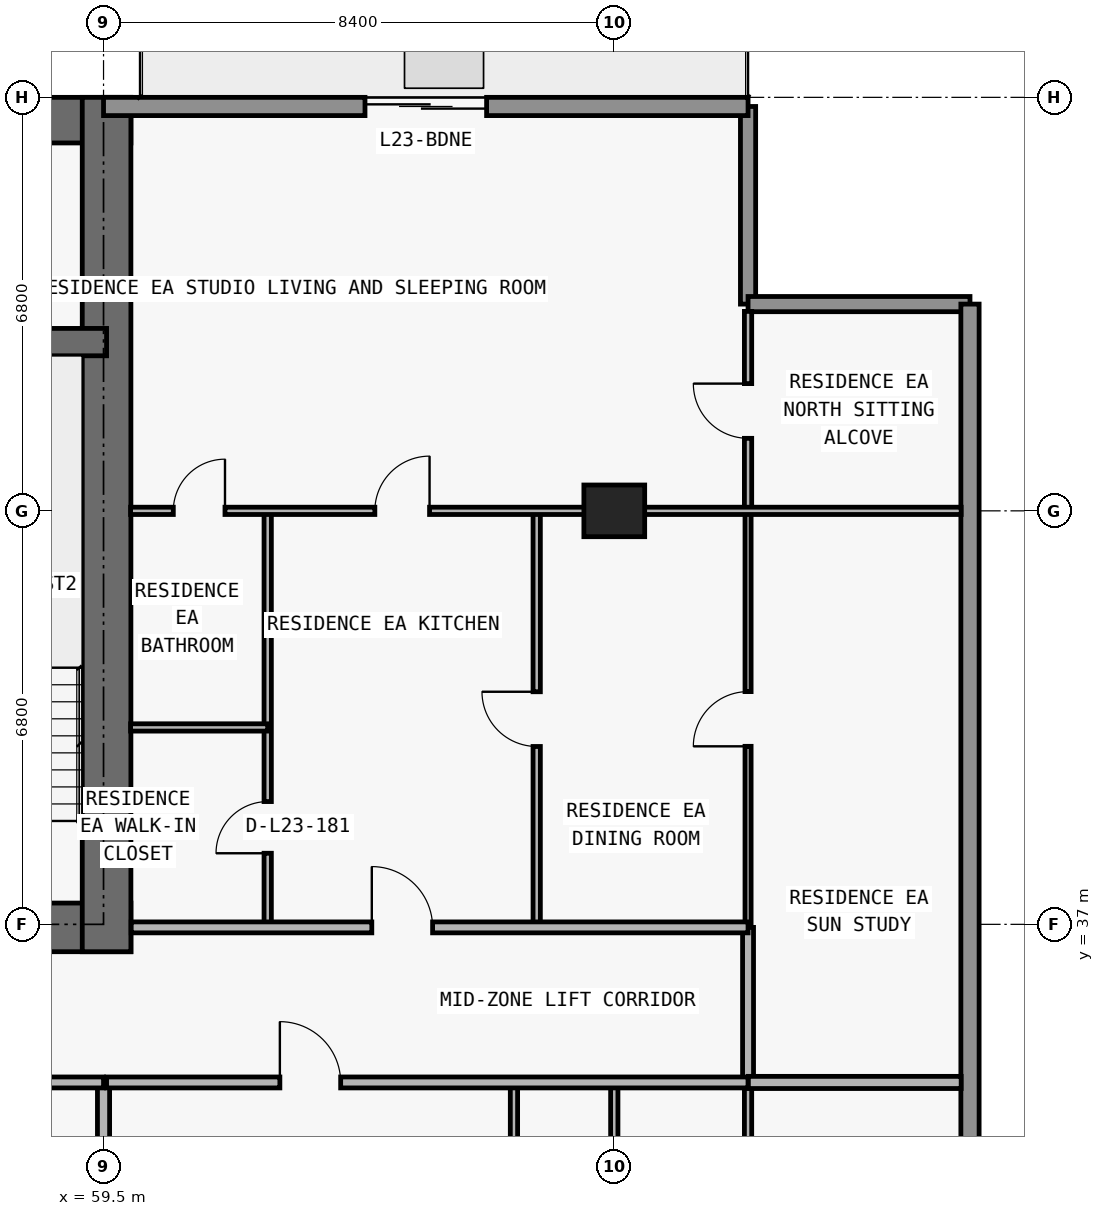
"""IFC4 building model, lengths in metres.
Left out: names, types, materials, properties, quantities, classifications, styles, units other than length and angle.
Written with IfcOpenShell. Run it as: python <this file> out.ifc"""

import sys

from ifc_helpers import new_model, si_unit, direction, frame, frame_2d, origin, origin_2d, place, context, subcontext, project, spatial, rectangle, extrude, element, fill, save


model = new_model("IFC4")
c1 = context("Model", 3, precision=1e-05, world=origin(), true_north=direction((0.0, 1.0)))
c2 = subcontext(c1, "Body", "Model", "MODEL_VIEW")
j1 = project(units=[si_unit("LENGTHUNIT", "METRE"), si_unit("PLANEANGLEUNIT", "RADIAN")], contexts=[c1])
p1 = place(None, origin())
s1 = spatial("IfcSite", under=j1, at=p1, CompositionType="ELEMENT")
p2 = place(p1, origin())
s2 = spatial("IfcBuilding", under=s1, at=p2, CompositionType="ELEMENT")
p3 = place(p2, frame((0.0, 0.0, 87.9)))
s3 = spatial("IfcBuildingStorey", under=s2, at=p3, CompositionType="ELEMENT", Elevation=87.9)
p4 = place(p3, frame((67.9, 43.8, 0.0), z_axis=(0.0, 0.0, 1.0), x_axis=(1.0, 0.0, 0.0)))
e1 = element("IfcColumn", 1, at=p4, inside=s3, PredefinedType="COLUMN", context=c2, shape_type="SweptSolid", body=[
    extrude(rectangle(XDim=1.0, YDim=0.85, at=origin_2d()), origin(), (0.0, 0.0, 1.0), 3.05),
])
p5 = place(p3, frame((17.85, 36.95, 0.0), z_axis=(0.0, 0.0, 1.0), x_axis=(1.0, 0.0, 0.0)))
e2 = element("IfcWall", 2, at=p5, inside=s3, PredefinedType="SHEAR", context=c2, shape_type="SweptSolid", body=[
    extrude(rectangle(XDim=42.1, YDim=0.8, at=frame_2d((21.05, 0.0))), origin(), (0.0, 0.0, 1.0), 3.05),
])
p6 = place(p5, frame((14.45, 0.0, 0.0)))
e3 = element("IfcOpeningElement", 3, at=p6, cuts=e2, PredefinedType="OPENING", context=c2, shape_type="SweptSolid", body=[
    extrude(rectangle(XDim=1.1, YDim=2.15, at=frame_2d((0.55, 1.075))), frame((0.0, 0.41, 0.0), z_axis=(0.0, -1.0, 0.0), x_axis=(1.0, 0.0, 0.0)), (0.0, 0.0, 1.0), 0.82),
])
p7 = place(p5, frame((6.3, 0.0, 0.0)))
e4 = element("IfcOpeningElement", 4, at=p7, cuts=e2, PredefinedType="OPENING", context=c2, shape_type="SweptSolid", body=[
    extrude(rectangle(XDim=1.05, YDim=2.15, at=frame_2d((0.525, 1.075))), frame((0.0, 0.41, 0.0), z_axis=(0.0, -1.0, 0.0), x_axis=(1.0, 0.0, 0.0)), (0.0, 0.0, 1.0), 0.82),
])
p8 = place(p5, frame((34.8, 0.0, 0.0)))
e5 = element("IfcOpeningElement", 5, at=p8, cuts=e2, PredefinedType="OPENING", context=c2, shape_type="SweptSolid", body=[
    extrude(rectangle(XDim=1.05, YDim=2.15, at=frame_2d((0.525, 1.075))), frame((0.0, 0.41, 0.0), z_axis=(0.0, -1.0, 0.0), x_axis=(1.0, 0.0, 0.0)), (0.0, 0.0, 1.0), 0.82),
])
p9 = place(p5, frame((10.913, 0.0, 0.0)))
e6 = element("IfcOpeningElement", 6, at=p9, cuts=e2, PredefinedType="OPENING", context=c2, shape_type="SweptSolid", body=[
    extrude(rectangle(XDim=1.05, YDim=2.15, at=frame_2d((0.525, 1.075))), frame((0.0, 0.41, 0.0), z_axis=(0.0, -1.0, 0.0), x_axis=(1.0, 0.0, 0.0)), (0.0, 0.0, 1.0), 0.82),
])
p10 = place(p5, frame((24.15, 0.0, 0.0)))
e7 = element("IfcOpeningElement", 7, at=p10, cuts=e2, PredefinedType="OPENING", context=c2, shape_type="SweptSolid", body=[
    extrude(rectangle(XDim=1.05, YDim=2.15, at=frame_2d((0.525, 1.075))), frame((0.0, 0.41, 0.0), z_axis=(0.0, -1.0, 0.0), x_axis=(1.0, 0.0, 0.0)), (0.0, 0.0, 1.0), 0.82),
])
p11 = place(p3, frame((17.85, 50.225, 0.0), z_axis=(0.0, 0.0, 1.0), x_axis=(1.0, 0.0, 0.0)))
e8 = element("IfcWall", 8, at=p11, inside=s3, PredefinedType="SHEAR", context=c2, shape_type="SweptSolid", body=[
    extrude(rectangle(XDim=42.1, YDim=0.75, at=frame_2d((21.05, 0.0))), origin(), (0.0, 0.0, 1.0), 3.05),
])
p12 = place(p3, frame((59.55, 36.55, 0.0), z_axis=(0.0, 0.0, 1.0), x_axis=(0.0, 1.0, 0.0)))
e9 = element("IfcWall", 9, at=p12, inside=s3, PredefinedType="SHEAR", context=c2, shape_type="SweptSolid", body=[
    extrude(rectangle(XDim=14.05, YDim=0.8, at=frame_2d((7.025, 0.0))), origin(), (0.0, 0.0, 1.0), 3.05),
])
p13 = place(p3, frame((18.25, 46.575, 0.0), z_axis=(0.0, 0.0, 1.0), x_axis=(1.0, 0.0, 0.0)))
e10 = element("IfcWall", 10, at=p13, inside=s3, PredefinedType="SHEAR", context=c2, shape_type="SweptSolid", body=[
    extrude(rectangle(XDim=41.3, YDim=0.45, at=frame_2d((20.65, 0.0))), origin(), (0.0, 0.0, 1.0), 3.05),
])
p14 = place(p13, frame((7.625, 0.0, 0.0)))
e11 = element("IfcOpeningElement", 11, at=p14, cuts=e10, PredefinedType="OPENING", context=c2, shape_type="SweptSolid", body=[
    extrude(rectangle(XDim=1.05, YDim=2.15, at=frame_2d((0.525, 1.075))), frame((0.0, 0.235, 0.0), z_axis=(0.0, -1.0, 0.0), x_axis=(1.0, 0.0, 0.0)), (0.0, 0.0, 1.0), 0.47),
])
p15 = place(p13, frame((32.675, 0.0, 0.0)))
e12 = element("IfcOpeningElement", 12, at=p15, cuts=e10, PredefinedType="OPENING", context=c2, shape_type="SweptSolid", body=[
    extrude(rectangle(XDim=1.05, YDim=2.15, at=frame_2d((0.525, 1.075))), frame((0.0, 0.235, 0.0), z_axis=(0.0, -1.0, 0.0), x_axis=(1.0, 0.0, 0.0)), (0.0, 0.0, 1.0), 0.47),
])
p16 = place(p3, frame((70.1, 50.45, 0.0), z_axis=(0.0, 0.0, 1.0), x_axis=(0.0, -1.0, 0.0)))
e13 = element("IfcWall", 13, at=p16, inside=s3, PredefinedType="ELEMENTEDWALL", context=c2, shape_type="SweptSolid", body=[
    extrude(rectangle(XDim=3.25, YDim=0.25, at=frame_2d((1.625, 0.0))), origin(), (0.0, 0.0, 1.0), 3.05),
])
p17 = place(p3, frame((70.1, 47.2, 0.0), z_axis=(0.0, 0.0, 1.0), x_axis=(1.0, 0.0, 0.0)))
e14 = element("IfcWall", 14, at=p17, inside=s3, PredefinedType="ELEMENTEDWALL", context=c2, shape_type="SweptSolid", body=[
    extrude(rectangle(XDim=3.65, YDim=0.25, at=frame_2d((1.825, 0.0))), origin(), (0.0, 0.0, 1.0), 3.05),
])
p18 = place(p3, frame((73.75, 47.2, 0.0), z_axis=(0.0, 0.0, 1.0), x_axis=(0.0, -1.0, 0.0)))
e15 = element("IfcWall", 15, at=p18, inside=s3, PredefinedType="STANDARD", context=c2, shape_type="SweptSolid", body=[
    extrude(rectangle(XDim=19.2, YDim=0.3, at=frame_2d((9.6, 0.0))), origin(), (0.0, 0.0, 1.0), 3.05),
])
p19 = place(p3, frame((59.5, 50.45, 0.0), z_axis=(0.0, 0.0, 1.0), x_axis=(1.0, 0.0, 0.0)))
e16 = element("IfcWall", 16, at=p19, inside=s3, PredefinedType="STANDARD", context=c2, shape_type="SweptSolid", body=[
    extrude(rectangle(XDim=10.6, YDim=0.3, at=frame_2d((5.3, 0.0))), origin(), (0.0, 0.0, 1.0), 3.05),
])
p20 = place(p19, frame((4.3, 0.0, 0.0)))
e17 = element("IfcOpeningElement", 17, at=p20, cuts=e16, PredefinedType="OPENING", context=c2, shape_type="SweptSolid", body=[
    extrude(rectangle(XDim=2.0, YDim=2.3, at=frame_2d((1.0, 1.15))), frame((0.0, 0.16, 0.0), z_axis=(0.0, -1.0, 0.0), x_axis=(1.0, 0.0, 0.0)), (0.0, 0.0, 1.0), 0.32),
])
p21 = place(p3, frame((59.5, 27.44, 0.0), z_axis=(0.0, 0.0, 1.0), x_axis=(0.0, 1.0, 0.0)))
e18 = element("IfcWall", 18, at=p21, inside=s3, PredefinedType="PARTITIONING", context=c2, shape_type="SweptSolid", body=[
    extrude(rectangle(XDim=6.96, YDim=0.2, at=frame_2d((3.48, 0.0))), origin(), (0.0, 0.0, 1.0), 2.174),
])
p22 = place(p3, frame((62.2, 36.95, 0.0), z_axis=(0.0, 0.0, 1.0), x_axis=(0.0, 1.0, 0.0)))
e19 = element("IfcWall", 19, at=p22, inside=s3, PredefinedType="PARTITIONING", context=c2, shape_type="SweptSolid", body=[
    extrude(rectangle(XDim=6.85, YDim=0.12, at=frame_2d((3.425, 0.0))), origin(), (0.0, 0.0, 1.0), 3.05),
])
p23 = place(p22, frame((1.219, 0.0, 0.0)))
e20 = element("IfcOpeningElement", 20, at=p23, cuts=e19, PredefinedType="OPENING", context=c2, shape_type="SweptSolid", body=[
    extrude(rectangle(XDim=0.85, YDim=2.1, at=frame_2d((0.425, 1.05))), frame((0.0, 0.07, 0.0), z_axis=(0.0, -1.0, 0.0), x_axis=(1.0, 0.0, 0.0)), (0.0, 0.0, 1.0), 0.14),
])
p24 = place(p3, frame((66.25, 27.44, 0.0), z_axis=(0.0, 0.0, 1.0), x_axis=(0.0, 1.0, 0.0)))
e21 = element("IfcWall", 21, at=p24, inside=s3, PredefinedType="PARTITIONING", context=c2, shape_type="SweptSolid", body=[
    extrude(rectangle(XDim=6.96, YDim=0.12, at=frame_2d((3.48, 0.0))), origin(), (0.0, 0.0, 1.0), 3.05),
])
p25 = place(p24, frame((3.055, 0.0, 0.0)))
e22 = element("IfcOpeningElement", 22, at=p25, cuts=e21, PredefinedType="OPENING", context=c2, shape_type="SweptSolid", body=[
    extrude(rectangle(XDim=0.85, YDim=2.1, at=frame_2d((0.425, 1.05))), frame((0.0, 0.07, 0.0), z_axis=(0.0, -1.0, 0.0), x_axis=(1.0, 0.0, 0.0)), (0.0, 0.0, 1.0), 0.14),
])
p26 = place(p3, frame((66.624, 36.95, 0.0), z_axis=(0.0, 0.0, 1.0), x_axis=(0.0, 1.0, 0.0)))
e23 = element("IfcWall", 23, at=p26, inside=s3, PredefinedType="PARTITIONING", context=c2, shape_type="SweptSolid", body=[
    extrude(rectangle(XDim=6.85, YDim=0.12, at=frame_2d((3.425, 0.0))), origin(), (0.0, 0.0, 1.0), 3.05),
])
p27 = place(p26, frame((2.975, 0.0, 0.0)))
e24 = element("IfcOpeningElement", 24, at=p27, cuts=e23, PredefinedType="OPENING", context=c2, shape_type="SweptSolid", body=[
    extrude(rectangle(XDim=0.9, YDim=2.15, at=frame_2d((0.45, 1.075))), frame((0.0, 0.07, 0.0), z_axis=(0.0, -1.0, 0.0), x_axis=(1.0, 0.0, 0.0)), (0.0, 0.0, 1.0), 0.14),
])
p28 = place(p3, frame((67.9, 27.44, 0.0), z_axis=(0.0, 0.0, 1.0), x_axis=(0.0, 1.0, 0.0)))
e25 = element("IfcWall", 25, at=p28, inside=s3, PredefinedType="PARTITIONING", context=c2, shape_type="SweptSolid", body=[
    extrude(rectangle(XDim=6.96, YDim=0.12, at=frame_2d((3.48, 0.0))), origin(), (0.0, 0.0, 1.0), 2.174),
])
p29 = place(p3, frame((70.1, 27.44, 0.0), z_axis=(0.0, 0.0, 1.0), x_axis=(0.0, 1.0, 0.0)))
e26 = element("IfcWall", 26, at=p29, inside=s3, PredefinedType="PARTITIONING", context=c2, shape_type="SweptSolid", body=[
    extrude(rectangle(XDim=6.96, YDim=0.12, at=frame_2d((3.48, 0.0))), origin(), (0.0, 0.0, 1.0), 3.05),
])
p30 = place(p3, frame((70.1, 34.405, 0.0), z_axis=(0.0, 0.0, 1.0), x_axis=(0.0, 1.0, 0.0)))
e27 = element("IfcWall", 27, at=p30, inside=s3, PredefinedType="PARTITIONING", context=c2, shape_type="SweptSolid", body=[
    extrude(rectangle(XDim=2.545, YDim=0.18, at=frame_2d((1.272, 0.0))), origin(), (0.0, 0.0, 1.0), 3.05),
])
p31 = place(p3, frame((70.1, 36.955, 0.0), z_axis=(0.0, 0.0, 1.0), x_axis=(0.0, 1.0, 0.0)))
e28 = element("IfcWall", 28, at=p31, inside=s3, PredefinedType="MOVABLE", context=c2, shape_type="SweptSolid", body=[
    extrude(rectangle(XDim=6.845, YDim=0.1, at=frame_2d((3.422, 0.0))), origin(), (0.0, 0.0, 1.0), 3.05),
])
p32 = place(p31, frame((2.972, 0.0, 0.0)))
e29 = element("IfcOpeningElement", 29, at=p32, cuts=e28, PredefinedType="OPENING", context=c2, shape_type="SweptSolid", body=[
    extrude(rectangle(XDim=0.9, YDim=2.15, at=frame_2d((0.45, 1.075))), frame((0.0, 0.06, 0.0), z_axis=(0.0, -1.0, 0.0), x_axis=(1.0, 0.0, 0.0)), (0.0, 0.0, 1.0), 0.12),
])
p33 = place(p3, frame((70.1, 43.805, 0.0), z_axis=(0.0, 0.0, 1.0), x_axis=(0.0, 1.0, 0.0)))
e30 = element("IfcWall", 30, at=p33, inside=s3, PredefinedType="PARTITIONING", context=c2, shape_type="SweptSolid", body=[
    extrude(rectangle(XDim=3.275, YDim=0.12, at=frame_2d((1.638, 0.0))), origin(), (0.0, 0.0, 1.0), 3.05),
])
p34 = place(p33, frame((1.188, 0.0, 0.0)))
e31 = element("IfcOpeningElement", 31, at=p34, cuts=e30, PredefinedType="OPENING", context=c2, shape_type="SweptSolid", body=[
    extrude(rectangle(XDim=0.9, YDim=2.15, at=frame_2d((0.45, 1.075))), frame((0.0, 0.07, 0.0), z_axis=(0.0, -1.0, 0.0), x_axis=(1.0, 0.0, 0.0)), (0.0, 0.0, 1.0), 0.14),
])
p35 = place(p3, frame((55.9, 34.4, 0.0), z_axis=(0.0, 0.0, 1.0), x_axis=(1.0, 0.0, 0.0)))
e32 = element("IfcWall", 32, at=p35, inside=s3, PredefinedType="PARTITIONING", context=c2, shape_type="SweptSolid", body=[
    extrude(rectangle(XDim=3.6, YDim=0.18, at=frame_2d((1.8, 0.0))), origin(), (0.0, 0.0, 1.0), 3.05),
])
p36 = place(p3, frame((59.55, 34.4, 0.0), z_axis=(0.0, 0.0, 1.0), x_axis=(1.0, 0.0, 0.0)))
e33 = element("IfcWall", 33, at=p36, inside=s3, PredefinedType="PARTITIONING", context=c2, shape_type="SweptSolid", body=[
    extrude(rectangle(XDim=10.55, YDim=0.18, at=frame_2d((5.275, 0.0))), origin(), (0.0, 0.0, 1.0), 3.05),
])
p37 = place(p36, frame((2.85, 0.0, 0.0)))
e34 = element("IfcOpeningElement", 34, at=p37, cuts=e33, PredefinedType="OPENING", context=c2, shape_type="SweptSolid", body=[
    extrude(rectangle(XDim=1.0, YDim=2.2, at=frame_2d((0.5, 1.1))), frame((0.0, 0.1, 0.0), z_axis=(0.0, -1.0, 0.0), x_axis=(1.0, 0.0, 0.0)), (0.0, 0.0, 1.0), 0.2),
])
p38 = place(p3, frame((70.105, 34.4, 0.0), z_axis=(0.0, 0.0, 1.0), x_axis=(1.0, 0.0, 0.0)))
e35 = element("IfcWall", 35, at=p38, inside=s3, PredefinedType="PARTITIONING", context=c2, shape_type="SweptSolid", body=[
    extrude(rectangle(XDim=3.5, YDim=0.2, at=frame_2d((1.75, 0.0))), origin(), (0.0, 0.0, 1.0), 3.05),
])
p39 = place(p3, frame((59.955, 36.95, 0.0), z_axis=(0.0, 0.0, 1.0), x_axis=(1.0, 0.0, 0.0)))
e36 = element("IfcWall", 36, at=p39, inside=s3, PredefinedType="PARTITIONING", context=c2, shape_type="SweptSolid", body=[
    extrude(rectangle(XDim=10.145, YDim=0.18, at=frame_2d((5.073, 0.0))), origin(), (0.0, 0.0, 1.0), 3.05),
])
p40 = place(p39, frame((3.957, 0.0, 0.0)))
e37 = element("IfcOpeningElement", 37, at=p40, cuts=e36, PredefinedType="OPENING", context=c2, shape_type="SweptSolid", body=[
    extrude(rectangle(XDim=1.0, YDim=2.2, at=frame_2d((0.5, 1.1))), frame((0.0, 0.1, 0.0), z_axis=(0.0, -1.0, 0.0), x_axis=(1.0, 0.0, 0.0)), (0.0, 0.0, 1.0), 0.2),
])
p41 = place(p3, frame((59.945, 40.238, 0.0), z_axis=(0.0, 0.0, 1.0), x_axis=(1.0, 0.0, 0.0)))
e38 = element("IfcWall", 38, at=p41, inside=s3, PredefinedType="PARTITIONING", context=c2, shape_type="SweptSolid", body=[
    extrude(rectangle(XDim=2.255, YDim=0.12, at=frame_2d((1.127, 0.0))), origin(), (0.0, 0.0, 1.0), 3.05),
])
p42 = place(p3, frame((59.945, 43.8, 0.0), z_axis=(0.0, 0.0, 1.0), x_axis=(1.0, 0.0, 0.0)))
e39 = element("IfcWall", 39, at=p42, inside=s3, PredefinedType="PARTITIONING", context=c2, shape_type="SweptSolid", body=[
    extrude(rectangle(XDim=13.66, YDim=0.12, at=frame_2d((6.83, 0.0))), origin(), (0.0, 0.0, 1.0), 2.339),
])
p43 = place(p42, frame((4.017, 0.0, 0.0)))
e40 = element("IfcOpeningElement", 40, at=p43, cuts=e39, PredefinedType="OPENING", context=c2, shape_type="SweptSolid", body=[
    extrude(rectangle(XDim=0.9, YDim=2.15, at=frame_2d((0.45, 1.075))), frame((0.0, 0.07, 0.0), z_axis=(0.0, -1.0, 0.0), x_axis=(1.0, 0.0, 0.0)), (0.0, 0.0, 1.0), 0.14),
])
p44 = place(p42, frame((0.702, 0.0, 0.0)))
e41 = element("IfcOpeningElement", 41, at=p44, cuts=e39, PredefinedType="OPENING", context=c2, shape_type="SweptSolid", body=[
    extrude(rectangle(XDim=0.85, YDim=2.1, at=frame_2d((0.425, 1.05))), frame((0.0, 0.07, 0.0), z_axis=(0.0, -1.0, 0.0), x_axis=(1.0, 0.0, 0.0)), (0.0, 0.0, 1.0), 0.14),
])
p45 = place(p20, origin())
e42 = element("IfcDoor", 42, at=p45, inside=s3, OperationType="DOUBLE_DOOR_SLIDING", PredefinedType="DOOR", context=c2, shape_type="SweptSolid", body=[
    extrude(rectangle(XDim=2.0, YDim=2.3, at=frame_2d((1.0, 1.15))), frame((0.0, 0.025, 0.0), z_axis=(0.0, -1.0, 0.0), x_axis=(1.0, 0.0, 0.0)), (0.0, 0.0, 1.0), 0.05),
])
fill(e17, e42)
p46 = place(p37, origin())
e43 = element("IfcDoor", 43, at=p46, inside=s3, OperationType="SINGLE_SWING_LEFT", PredefinedType="DOOR", context=c2, shape_type="SweptSolid", body=[
    extrude(rectangle(XDim=1.0, YDim=2.2, at=frame_2d((0.5, 1.1))), frame((0.0, 0.025, 0.0), z_axis=(0.0, -1.0, 0.0), x_axis=(1.0, 0.0, 0.0)), (0.0, 0.0, 1.0), 0.05),
])
fill(e34, e43)
p47 = place(p27, origin())
e44 = element("IfcDoor", 44, at=p47, inside=s3, OperationType="SINGLE_SWING_RIGHT", PredefinedType="DOOR", context=c2, shape_type="SweptSolid", body=[
    extrude(rectangle(XDim=0.9, YDim=2.15, at=frame_2d((0.45, 1.075))), frame((0.0, 0.025, 0.0), z_axis=(0.0, -1.0, 0.0), x_axis=(1.0, 0.0, 0.0)), (0.0, 0.0, 1.0), 0.05),
])
fill(e24, e44)
p48 = place(p40, origin())
e45 = element("IfcDoor", 45, at=p48, inside=s3, OperationType="SINGLE_SWING_LEFT", PredefinedType="DOOR", context=c2, shape_type="SweptSolid", body=[
    extrude(rectangle(XDim=1.0, YDim=2.2, at=frame_2d((0.5, 1.1))), frame((0.0, 0.025, 0.0), z_axis=(0.0, -1.0, 0.0), x_axis=(1.0, 0.0, 0.0)), (0.0, 0.0, 1.0), 0.05),
])
fill(e37, e45)
p49 = place(p43, origin())
e46 = element("IfcDoor", 46, at=p49, inside=s3, OperationType="SINGLE_SWING_RIGHT", PredefinedType="DOOR", context=c2, shape_type="SweptSolid", body=[
    extrude(rectangle(XDim=0.9, YDim=2.15, at=frame_2d((0.45, 1.075))), frame((0.0, 0.025, 0.0), z_axis=(0.0, -1.0, 0.0), x_axis=(1.0, 0.0, 0.0)), (0.0, 0.0, 1.0), 0.05),
])
fill(e40, e46)
p50 = place(p23, origin())
e47 = element("IfcDoor", 47, at=p50, inside=s3, OperationType="SINGLE_SWING_LEFT", PredefinedType="DOOR", context=c2, shape_type="SweptSolid", body=[
    extrude(rectangle(XDim=0.85, YDim=2.1, at=frame_2d((0.425, 1.05))), frame((0.0, 0.025, 0.0), z_axis=(0.0, -1.0, 0.0), x_axis=(1.0, 0.0, 0.0)), (0.0, 0.0, 1.0), 0.05),
])
fill(e20, e47)
p51 = place(p44, origin())
e48 = element("IfcDoor", 48, at=p51, inside=s3, OperationType="SINGLE_SWING_RIGHT", PredefinedType="DOOR", context=c2, shape_type="SweptSolid", body=[
    extrude(rectangle(XDim=0.85, YDim=2.1, at=frame_2d((0.425, 1.05))), frame((0.0, 0.025, 0.0), z_axis=(0.0, -1.0, 0.0), x_axis=(1.0, 0.0, 0.0)), (0.0, 0.0, 1.0), 0.05),
])
fill(e41, e48)
p52 = place(p32, origin())
e49 = element("IfcDoor", 49, at=p52, inside=s3, OperationType="SINGLE_SWING_LEFT", PredefinedType="DOOR", context=c2, shape_type="SweptSolid", body=[
    extrude(rectangle(XDim=0.9, YDim=2.15, at=frame_2d((0.45, 1.075))), frame((0.0, 0.025, 0.0), z_axis=(0.0, -1.0, 0.0), x_axis=(1.0, 0.0, 0.0)), (0.0, 0.0, 1.0), 0.05),
])
fill(e29, e49)
p53 = place(p34, origin())
e50 = element("IfcDoor", 50, at=p53, inside=s3, OperationType="SINGLE_SWING_RIGHT", PredefinedType="DOOR", context=c2, shape_type="SweptSolid", body=[
    extrude(rectangle(XDim=0.9, YDim=2.15, at=frame_2d((0.45, 1.075))), frame((0.0, 0.025, 0.0), z_axis=(0.0, -1.0, 0.0), x_axis=(1.0, 0.0, 0.0)), (0.0, 0.0, 1.0), 0.05),
])
fill(e31, e50)
save(model, sys.argv[1])
